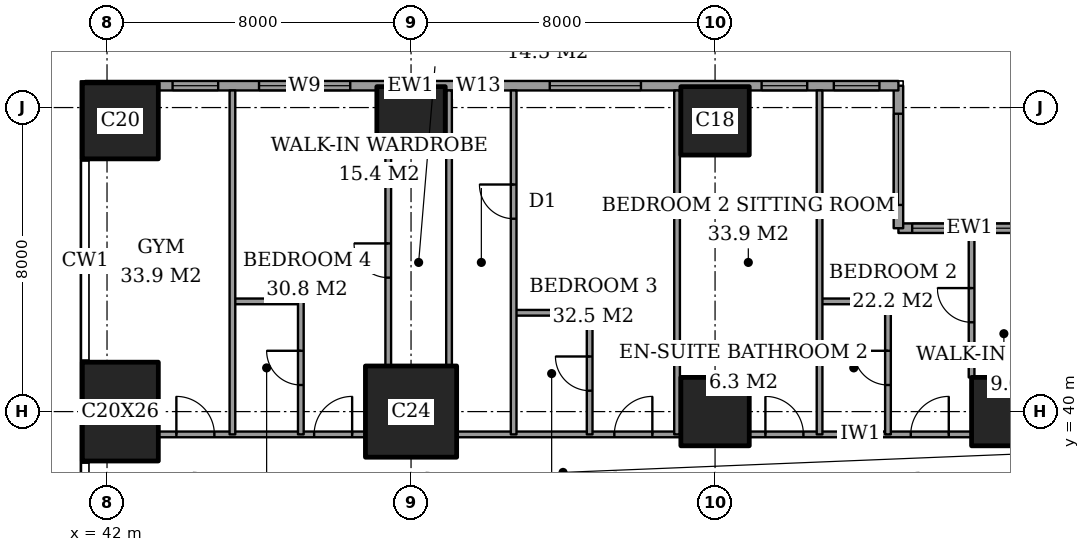
"""IFC4 building model, lengths in metres.
Left out: names, types, materials, properties, quantities, classifications, styles, units other than length and angle.
Written with IfcOpenShell. Run it as: python <this file> out.ifc"""

import sys

from ifc_helpers import new_model, si_unit, direction, frame, frame_2d, origin, origin_2d, place, context, subcontext, project, spatial, rectangle, extrude, element, fill, save


model = new_model("IFC4")
c1 = context("Model", 3, precision=1e-05, world=origin(), true_north=direction((0.0, 1.0)))
c2 = subcontext(c1, "Body", "Model", "MODEL_VIEW")
j1 = project(units=[si_unit("LENGTHUNIT", "METRE"), si_unit("PLANEANGLEUNIT", "RADIAN")], contexts=[c1])
p1 = place(None, origin())
s1 = spatial("IfcSite", under=j1, at=p1, CompositionType="ELEMENT")
p2 = place(p1, origin())
s2 = spatial("IfcBuilding", under=s1, at=p2, CompositionType="ELEMENT")
p3 = place(p2, frame((0.0, 0.0, 193.0)))
s3 = spatial("IfcBuildingStorey", under=s2, at=p3, CompositionType="ELEMENT", Elevation=193.0)
p4 = place(p3, frame((42.35, 40.0, 0.0), z_axis=(0.0, 0.0, 1.0), x_axis=(1.0, 0.0, 0.0)))
e1 = element("IfcColumn", 1, at=p4, inside=s3, PredefinedType="COLUMN", context=c2, shape_type="SweptSolid", body=[
    extrude(rectangle(XDim=2.0, YDim=2.6, at=origin_2d()), origin(), (0.0, 0.0, 1.0), 3.6),
])
p5 = place(p3, frame((42.35, 47.65, 0.0), z_axis=(0.0, 0.0, 1.0), x_axis=(1.0, 0.0, 0.0)))
e2 = element("IfcColumn", 2, at=p5, inside=s3, PredefinedType="COLUMN", context=c2, shape_type="SweptSolid", body=[
    extrude(rectangle(XDim=2.0, YDim=2.0, at=origin_2d()), origin(), (0.0, 0.0, 1.0), 3.6),
])
p6 = place(p3, frame((50.0, 40.0, 0.0), z_axis=(0.0, 0.0, 1.0), x_axis=(1.0, 0.0, 0.0)))
e3 = element("IfcColumn", 3, at=p6, inside=s3, PredefinedType="COLUMN", context=c2, shape_type="SweptSolid", body=[
    extrude(rectangle(XDim=2.4, YDim=2.4, at=origin_2d()), origin(), (0.0, 0.0, 1.0), 3.6),
])
for number, where, z_axis, x_axis in (
    (4, (50.0, 47.65, 0.0), (0.0, 0.0, 1.0), (1.0, 0.0, 0.0)),
    (5, (58.0, 40.0, 0.0), (0.0, 0.0, 1.0), (1.0, 0.0, 0.0)),
    (6, (58.0, 47.65, 0.0), (0.0, 0.0, 1.0), (1.0, 0.0, 0.0)),
    (7, (65.65, 40.0, 0.0), (0.0, 0.0, 1.0), (1.0, 0.0, 0.0)),
):
    element("IfcColumn", number, at=place(p3, frame(where, z_axis=z_axis, x_axis=x_axis)), inside=s3, PredefinedType="COLUMN", context=c2, shape_type="SweptSolid", body=[
        extrude(rectangle(XDim=1.8, YDim=1.8, at=origin_2d()), origin(), (0.0, 0.0, 1.0), 3.6),
    ])
p7 = place(p3, frame((66.575, 44.825, 0.0), z_axis=(0.0, 0.0, 1.0), x_axis=(-1.0, 0.0, 0.0)))
e8 = element("IfcWall", 8, at=p7, inside=s3, PredefinedType="SOLIDWALL", context=c2, shape_type="SweptSolid", body=[
    extrude(rectangle(XDim=3.75, YDim=0.25, at=frame_2d((1.875, 0.0))), origin(), (0.0, 0.0, 1.0), 3.6),
])
p8 = place(p7, frame((0.45, 0.0, 0.2)))
e9 = element("IfcOpeningElement", 9, at=p8, cuts=e8, PredefinedType="OPENING", context=c2, shape_type="SweptSolid", body=[
    extrude(rectangle(XDim=1.2, YDim=2.4, at=frame_2d((0.6, 1.2))), frame((0.0, 0.135, 0.0), z_axis=(0.0, -1.0, 0.0), x_axis=(1.0, 0.0, 0.0)), (0.0, 0.0, 1.0), 0.27),
])
p9 = place(p7, frame((2.188, 0.0, 0.2)))
e10 = element("IfcOpeningElement", 10, at=p9, cuts=e8, PredefinedType="OPENING", context=c2, shape_type="SweptSolid", body=[
    extrude(rectangle(XDim=1.2, YDim=2.4, at=frame_2d((0.6, 1.2))), frame((0.0, 0.135, 0.0), z_axis=(0.0, -1.0, 0.0), x_axis=(1.0, 0.0, 0.0)), (0.0, 0.0, 1.0), 0.27),
])
p10 = place(p3, frame((62.825, 44.825, 0.0), z_axis=(0.0, 0.0, 1.0), x_axis=(0.0, 1.0, 0.0)))
e11 = element("IfcWall", 11, at=p10, inside=s3, PredefinedType="SOLIDWALL", context=c2, shape_type="SweptSolid", body=[
    extrude(rectangle(XDim=3.75, YDim=0.25, at=frame_2d((1.875, 0.0))), origin(), (0.0, 0.0, 1.0), 3.6),
])
p11 = place(p10, frame((0.613, 0.0, 0.2)))
e12 = element("IfcOpeningElement", 12, at=p11, cuts=e11, PredefinedType="OPENING", context=c2, shape_type="SweptSolid", body=[
    extrude(rectangle(XDim=2.4, YDim=2.4, at=frame_2d((1.2, 1.2))), frame((0.0, 0.135, 0.0), z_axis=(0.0, -1.0, 0.0), x_axis=(1.0, 0.0, 0.0)), (0.0, 0.0, 1.0), 0.27),
])
p12 = place(p3, frame((62.825, 48.575, 0.0), z_axis=(0.0, 0.0, 1.0), x_axis=(-1.0, 0.0, 0.0)))
e13 = element("IfcWall", 13, at=p12, inside=s3, PredefinedType="SOLIDWALL", context=c2, shape_type="SweptSolid", body=[
    extrude(rectangle(XDim=21.4, YDim=0.25, at=frame_2d((10.7, 0.0))), origin(), (0.0, 0.0, 1.0), 3.6),
])
p13 = place(p12, frame((0.5, 0.0, 0.2)))
e14 = element("IfcOpeningElement", 14, at=p13, cuts=e13, PredefinedType="OPENING", context=c2, shape_type="SweptSolid", body=[
    extrude(rectangle(XDim=1.2, YDim=2.4, at=frame_2d((0.6, 1.2))), frame((0.0, 0.135, 0.0), z_axis=(0.0, -1.0, 0.0), x_axis=(1.0, 0.0, 0.0)), (0.0, 0.0, 1.0), 0.27),
])
p14 = place(p12, frame((2.4, 0.0, 0.2)))
e15 = element("IfcOpeningElement", 15, at=p14, cuts=e13, PredefinedType="OPENING", context=c2, shape_type="SweptSolid", body=[
    extrude(rectangle(XDim=1.2, YDim=2.4, at=frame_2d((0.6, 1.2))), frame((0.0, 0.135, 0.0), z_axis=(0.0, -1.0, 0.0), x_axis=(1.0, 0.0, 0.0)), (0.0, 0.0, 1.0), 0.27),
])
p15 = place(p12, frame((6.775, 0.0, 0.2)))
e16 = element("IfcOpeningElement", 16, at=p15, cuts=e13, PredefinedType="OPENING", context=c2, shape_type="SweptSolid", body=[
    extrude(rectangle(XDim=2.4, YDim=2.4, at=frame_2d((1.2, 1.2))), frame((0.0, 0.135, 0.0), z_axis=(0.0, -1.0, 0.0), x_axis=(1.0, 0.0, 0.0)), (0.0, 0.0, 1.0), 0.27),
])
p16 = place(p12, frame((10.45, 0.0, 0.2)))
e17 = element("IfcOpeningElement", 17, at=p16, cuts=e13, PredefinedType="OPENING", context=c2, shape_type="SweptSolid", body=[
    extrude(rectangle(XDim=1.2, YDim=2.4, at=frame_2d((0.6, 1.2))), frame((0.0, 0.135, 0.0), z_axis=(0.0, -1.0, 0.0), x_axis=(1.0, 0.0, 0.0)), (0.0, 0.0, 1.0), 0.27),
])
p17 = place(p12, frame((14.425, 0.0, 0.2)))
e18 = element("IfcOpeningElement", 18, at=p17, cuts=e13, PredefinedType="OPENING", context=c2, shape_type="SweptSolid", body=[
    extrude(rectangle(XDim=2.4, YDim=2.4, at=frame_2d((1.2, 1.2))), frame((0.0, 0.135, 0.0), z_axis=(0.0, -1.0, 0.0), x_axis=(1.0, 0.0, 0.0)), (0.0, 0.0, 1.0), 0.27),
])
p18 = place(p12, frame((17.9, 0.0, 0.2)))
e19 = element("IfcOpeningElement", 19, at=p18, cuts=e13, PredefinedType="OPENING", context=c2, shape_type="SweptSolid", body=[
    extrude(rectangle(XDim=1.2, YDim=2.4, at=frame_2d((0.6, 1.2))), frame((0.0, 0.135, 0.0), z_axis=(0.0, -1.0, 0.0), x_axis=(1.0, 0.0, 0.0)), (0.0, 0.0, 1.0), 0.27),
])
p19 = place(p3, frame((43.35, 39.4, 0.0), z_axis=(0.0, 0.0, 1.0), x_axis=(1.0, 0.0, 0.0)))
e20 = element("IfcWall", 20, at=p19, inside=s3, PredefinedType="PARTITIONING", context=c2, shape_type="SweptSolid", body=[
    extrude(rectangle(XDim=5.45, YDim=0.15, at=frame_2d((2.725, 0.0))), origin(), (0.0, 0.0, 1.0), 3.35),
])
p20 = place(p19, frame((4.1, 0.0, 0.0)))
e21 = element("IfcOpeningElement", 21, at=p20, cuts=e20, PredefinedType="OPENING", context=c2, shape_type="SweptSolid", body=[
    extrude(rectangle(XDim=1.0, YDim=2.1, at=frame_2d((0.5, 1.05))), frame((0.0, 0.085, 0.0), z_axis=(0.0, -1.0, 0.0), x_axis=(1.0, 0.0, 0.0)), (0.0, 0.0, 1.0), 0.17),
])
p21 = place(p19, frame((0.475, 0.0, 0.0)))
e22 = element("IfcOpeningElement", 22, at=p21, cuts=e20, PredefinedType="OPENING", context=c2, shape_type="SweptSolid", body=[
    extrude(rectangle(XDim=1.0, YDim=2.1, at=frame_2d((0.5, 1.05))), frame((0.0, 0.085, 0.0), z_axis=(0.0, -1.0, 0.0), x_axis=(1.0, 0.0, 0.0)), (0.0, 0.0, 1.0), 0.17),
])
p22 = place(p3, frame((51.2, 39.4, 0.0), z_axis=(0.0, 0.0, 1.0), x_axis=(1.0, 0.0, 0.0)))
e23 = element("IfcWall", 23, at=p22, inside=s3, PredefinedType="PARTITIONING", context=c2, shape_type="SweptSolid", body=[
    extrude(rectangle(XDim=5.9, YDim=0.15, at=frame_2d((2.95, 0.0))), origin(), (0.0, 0.0, 1.0), 3.35),
])
p23 = place(p22, frame((4.15, 0.0, 0.0)))
e24 = element("IfcOpeningElement", 24, at=p23, cuts=e23, PredefinedType="OPENING", context=c2, shape_type="SweptSolid", body=[
    extrude(rectangle(XDim=1.0, YDim=2.1, at=frame_2d((0.5, 1.05))), frame((0.0, 0.085, 0.0), z_axis=(0.0, -1.0, 0.0), x_axis=(1.0, 0.0, 0.0)), (0.0, 0.0, 1.0), 0.17),
])
p24 = place(p3, frame((58.9, 39.4, 0.0), z_axis=(0.0, 0.0, 1.0), x_axis=(1.0, 0.0, 0.0)))
e25 = element("IfcWall", 25, at=p24, inside=s3, PredefinedType="PARTITIONING", context=c2, shape_type="SweptSolid", body=[
    extrude(rectangle(XDim=5.85, YDim=0.15, at=frame_2d((2.925, 0.0))), origin(), (0.0, 0.0, 1.0), 3.35),
])
p25 = place(p24, frame((4.25, 0.0, 0.0)))
e26 = element("IfcOpeningElement", 26, at=p25, cuts=e25, PredefinedType="OPENING", context=c2, shape_type="SweptSolid", body=[
    extrude(rectangle(XDim=1.0, YDim=2.1, at=frame_2d((0.5, 1.05))), frame((0.0, 0.085, 0.0), z_axis=(0.0, -1.0, 0.0), x_axis=(1.0, 0.0, 0.0)), (0.0, 0.0, 1.0), 0.17),
])
p26 = place(p24, frame((0.425, 0.0, 0.0)))
e27 = element("IfcOpeningElement", 27, at=p26, cuts=e25, PredefinedType="OPENING", context=c2, shape_type="SweptSolid", body=[
    extrude(rectangle(XDim=1.0, YDim=2.1, at=frame_2d((0.5, 1.05))), frame((0.0, 0.085, 0.0), z_axis=(0.0, -1.0, 0.0), x_axis=(1.0, 0.0, 0.0)), (0.0, 0.0, 1.0), 0.17),
])
p27 = place(p3, frame((52.7, 42.6, 0.0), z_axis=(0.0, 0.0, 1.0), x_axis=(1.0, 0.0, 0.0)))
e28 = element("IfcWall", 28, at=p27, inside=s3, PredefinedType="PARTITIONING", context=c2, shape_type="SweptSolid", body=[
    extrude(rectangle(XDim=2.0, YDim=0.15, at=frame_2d((1.0, 0.0))), origin(), (0.0, 0.0, 1.0), 3.35),
])
for number, where, z_axis, x_axis in (
    (29, (45.3, 42.9, 0.0), (0.0, 0.0, 1.0), (1.0, 0.0, 0.0)),
    (30, (60.75, 42.9, 0.0), (0.0, 0.0, 1.0), (1.0, 0.0, 0.0)),
):
    element("IfcWall", number, at=place(p3, frame(where, z_axis=z_axis, x_axis=x_axis)), inside=s3, PredefinedType="PARTITIONING", context=c2, shape_type="SweptSolid", body=[
        extrude(rectangle(XDim=1.8, YDim=0.15, at=frame_2d((0.9, 0.0))), origin(), (0.0, 0.0, 1.0), 3.35),
    ])
p28 = place(p3, frame((45.3, 39.4, 0.0), z_axis=(0.0, 0.0, 1.0), x_axis=(0.0, 1.0, 0.0)))
e31 = element("IfcWall", 31, at=p28, inside=s3, PredefinedType="PARTITIONING", context=c2, shape_type="SweptSolid", body=[
    extrude(rectangle(XDim=9.05, YDim=0.15, at=frame_2d((4.525, 0.0))), origin(), (0.0, 0.0, 1.0), 3.35),
])
p29 = place(p3, frame((47.1, 39.4, 0.0), z_axis=(0.0, 0.0, 1.0), x_axis=(0.0, 1.0, 0.0)))
e32 = element("IfcWall", 32, at=p29, inside=s3, PredefinedType="PARTITIONING", context=c2, shape_type="SweptSolid", body=[
    extrude(rectangle(XDim=3.5, YDim=0.15, at=frame_2d((1.75, 0.0))), origin(), (0.0, 0.0, 1.0), 3.35),
])
p30 = place(p29, frame((1.3, 0.0, 0.0)))
e33 = element("IfcOpeningElement", 33, at=p30, cuts=e32, PredefinedType="OPENING", context=c2, shape_type="SweptSolid", body=[
    extrude(rectangle(XDim=0.9, YDim=2.1, at=frame_2d((0.45, 1.05))), frame((0.0, 0.085, 0.0), z_axis=(0.0, -1.0, 0.0), x_axis=(1.0, 0.0, 0.0)), (0.0, 0.0, 1.0), 0.17),
])
p31 = place(p3, frame((49.4, 41.2, 0.0), z_axis=(0.0, 0.0, 1.0), x_axis=(0.0, 1.0, 0.0)))
e34 = element("IfcWall", 34, at=p31, inside=s3, PredefinedType="PARTITIONING", context=c2, shape_type="SweptSolid", body=[
    extrude(rectangle(XDim=5.55, YDim=0.15, at=frame_2d((2.775, 0.0))), origin(), (0.0, 0.0, 1.0), 3.35),
])
p32 = place(p31, frame((2.325, 0.0, 0.0)))
e35 = element("IfcOpeningElement", 35, at=p32, cuts=e34, PredefinedType="OPENING", context=c2, shape_type="SweptSolid", body=[
    extrude(rectangle(XDim=0.9, YDim=2.1, at=frame_2d((0.45, 1.05))), frame((0.0, 0.085, 0.0), z_axis=(0.0, -1.0, 0.0), x_axis=(1.0, 0.0, 0.0)), (0.0, 0.0, 1.0), 0.17),
])
p33 = place(p3, frame((51.0, 41.2, 0.0), z_axis=(0.0, 0.0, 1.0), x_axis=(0.0, 1.0, 0.0)))
e36 = element("IfcWall", 36, at=p33, inside=s3, PredefinedType="PARTITIONING", context=c2, shape_type="SweptSolid", body=[
    extrude(rectangle(XDim=7.25, YDim=0.15, at=frame_2d((3.625, 0.0))), origin(), (0.0, 0.0, 1.0), 3.35),
])
p34 = place(p3, frame((52.7, 39.4, 0.0), z_axis=(0.0, 0.0, 1.0), x_axis=(0.0, 1.0, 0.0)))
e37 = element("IfcWall", 37, at=p34, inside=s3, PredefinedType="PARTITIONING", context=c2, shape_type="SweptSolid", body=[
    extrude(rectangle(XDim=9.05, YDim=0.15, at=frame_2d((4.525, 0.0))), origin(), (0.0, 0.0, 1.0), 3.35),
])
p35 = place(p34, frame((5.675, 0.0, 0.0)))
e38 = element("IfcOpeningElement", 38, at=p35, cuts=e37, PredefinedType="OPENING", context=c2, shape_type="SweptSolid", body=[
    extrude(rectangle(XDim=0.9, YDim=2.1, at=frame_2d((0.45, 1.05))), frame((0.0, 0.085, 0.0), z_axis=(0.0, -1.0, 0.0), x_axis=(1.0, 0.0, 0.0)), (0.0, 0.0, 1.0), 0.17),
])
p36 = place(p3, frame((54.7, 39.4, 0.0), z_axis=(0.0, 0.0, 1.0), x_axis=(0.0, 1.0, 0.0)))
e39 = element("IfcWall", 39, at=p36, inside=s3, PredefinedType="PARTITIONING", context=c2, shape_type="SweptSolid", body=[
    extrude(rectangle(XDim=3.2, YDim=0.15, at=frame_2d((1.6, 0.0))), origin(), (0.0, 0.0, 1.0), 3.35),
])
p37 = place(p36, frame((1.15, 0.0, 0.0)))
e40 = element("IfcOpeningElement", 40, at=p37, cuts=e39, PredefinedType="OPENING", context=c2, shape_type="SweptSolid", body=[
    extrude(rectangle(XDim=0.9, YDim=2.1, at=frame_2d((0.45, 1.05))), frame((0.0, 0.085, 0.0), z_axis=(0.0, -1.0, 0.0), x_axis=(1.0, 0.0, 0.0)), (0.0, 0.0, 1.0), 0.17),
])
for number, where, z_axis, x_axis in (
    (41, (57.0, 39.4, 0.0), (0.0, 0.0, 1.0), (0.0, 1.0, 0.0)),
    (42, (60.75, 39.4, 0.0), (0.0, 0.0, 1.0), (0.0, 1.0, 0.0)),
):
    element("IfcWall", number, at=place(p3, frame(where, z_axis=z_axis, x_axis=x_axis)), inside=s3, PredefinedType="PARTITIONING", context=c2, shape_type="SweptSolid", body=[
        extrude(rectangle(XDim=9.05, YDim=0.15, at=frame_2d((4.525, 0.0))), origin(), (0.0, 0.0, 1.0), 3.35),
    ])
p38 = place(p3, frame((62.55, 39.4, 0.0), z_axis=(0.0, 0.0, 1.0), x_axis=(0.0, 1.0, 0.0)))
e43 = element("IfcWall", 43, at=p38, inside=s3, PredefinedType="PARTITIONING", context=c2, shape_type="SweptSolid", body=[
    extrude(rectangle(XDim=3.5, YDim=0.15, at=frame_2d((1.75, 0.0))), origin(), (0.0, 0.0, 1.0), 3.35),
])
p39 = place(p38, frame((1.3, 0.0, 0.0)))
e44 = element("IfcOpeningElement", 44, at=p39, cuts=e43, PredefinedType="OPENING", context=c2, shape_type="SweptSolid", body=[
    extrude(rectangle(XDim=0.9, YDim=2.1, at=frame_2d((0.45, 1.05))), frame((0.0, 0.085, 0.0), z_axis=(0.0, -1.0, 0.0), x_axis=(1.0, 0.0, 0.0)), (0.0, 0.0, 1.0), 0.17),
])
p40 = place(p3, frame((64.75, 40.9, 0.0), z_axis=(0.0, 0.0, 1.0), x_axis=(0.0, 1.0, 0.0)))
e45 = element("IfcWall", 45, at=p40, inside=s3, PredefinedType="PARTITIONING", context=c2, shape_type="SweptSolid", body=[
    extrude(rectangle(XDim=3.8, YDim=0.15, at=frame_2d((1.9, 0.0))), origin(), (0.0, 0.0, 1.0), 3.35),
])
p41 = place(p40, frame((1.45, 0.0, 0.0)))
e46 = element("IfcOpeningElement", 46, at=p41, cuts=e45, PredefinedType="OPENING", context=c2, shape_type="SweptSolid", body=[
    extrude(rectangle(XDim=0.9, YDim=2.1, at=frame_2d((0.45, 1.05))), frame((0.0, 0.085, 0.0), z_axis=(0.0, -1.0, 0.0), x_axis=(1.0, 0.0, 0.0)), (0.0, 0.0, 1.0), 0.17),
])
p42 = place(p8, origin())
e47 = element("IfcWindow", 47, at=p42, inside=s3, PartitioningType="SINGLE_PANEL", PredefinedType="WINDOW", context=c2, shape_type="SweptSolid", body=[
    extrude(rectangle(XDim=1.2, YDim=2.4, at=frame_2d((0.6, 1.2))), frame((0.0, 0.03, 0.0), z_axis=(0.0, -1.0, 0.0), x_axis=(1.0, 0.0, 0.0)), (0.0, 0.0, 1.0), 0.06),
])
fill(e9, e47)
p43 = place(p9, origin())
e48 = element("IfcWindow", 48, at=p43, inside=s3, PartitioningType="SINGLE_PANEL", PredefinedType="WINDOW", context=c2, shape_type="SweptSolid", body=[
    extrude(rectangle(XDim=1.2, YDim=2.4, at=frame_2d((0.6, 1.2))), frame((0.0, 0.03, 0.0), z_axis=(0.0, -1.0, 0.0), x_axis=(1.0, 0.0, 0.0)), (0.0, 0.0, 1.0), 0.06),
])
fill(e10, e48)
p44 = place(p11, origin())
e49 = element("IfcWindow", 49, at=p44, inside=s3, PartitioningType="SINGLE_PANEL", PredefinedType="WINDOW", context=c2, shape_type="SweptSolid", body=[
    extrude(rectangle(XDim=2.4, YDim=2.4, at=frame_2d((1.2, 1.2))), frame((0.0, 0.03, 0.0), z_axis=(0.0, -1.0, 0.0), x_axis=(1.0, 0.0, 0.0)), (0.0, 0.0, 1.0), 0.06),
])
fill(e12, e49)
p45 = place(p13, origin())
e50 = element("IfcWindow", 50, at=p45, inside=s3, PartitioningType="SINGLE_PANEL", PredefinedType="WINDOW", context=c2, shape_type="SweptSolid", body=[
    extrude(rectangle(XDim=1.2, YDim=2.4, at=frame_2d((0.6, 1.2))), frame((0.0, 0.03, 0.0), z_axis=(0.0, -1.0, 0.0), x_axis=(1.0, 0.0, 0.0)), (0.0, 0.0, 1.0), 0.06),
])
fill(e14, e50)
p46 = place(p14, origin())
e51 = element("IfcWindow", 51, at=p46, inside=s3, PartitioningType="SINGLE_PANEL", PredefinedType="WINDOW", context=c2, shape_type="SweptSolid", body=[
    extrude(rectangle(XDim=1.2, YDim=2.4, at=frame_2d((0.6, 1.2))), frame((0.0, 0.03, 0.0), z_axis=(0.0, -1.0, 0.0), x_axis=(1.0, 0.0, 0.0)), (0.0, 0.0, 1.0), 0.06),
])
fill(e15, e51)
p47 = place(p15, origin())
e52 = element("IfcWindow", 52, at=p47, inside=s3, PartitioningType="SINGLE_PANEL", PredefinedType="WINDOW", context=c2, shape_type="SweptSolid", body=[
    extrude(rectangle(XDim=2.4, YDim=2.4, at=frame_2d((1.2, 1.2))), frame((0.0, 0.03, 0.0), z_axis=(0.0, -1.0, 0.0), x_axis=(1.0, 0.0, 0.0)), (0.0, 0.0, 1.0), 0.06),
])
fill(e16, e52)
p48 = place(p16, origin())
e53 = element("IfcWindow", 53, at=p48, inside=s3, PartitioningType="SINGLE_PANEL", PredefinedType="WINDOW", context=c2, shape_type="SweptSolid", body=[
    extrude(rectangle(XDim=1.2, YDim=2.4, at=frame_2d((0.6, 1.2))), frame((0.0, 0.03, 0.0), z_axis=(0.0, -1.0, 0.0), x_axis=(1.0, 0.0, 0.0)), (0.0, 0.0, 1.0), 0.06),
])
fill(e17, e53)
p49 = place(p17, origin())
e54 = element("IfcWindow", 54, at=p49, inside=s3, PartitioningType="SINGLE_PANEL", PredefinedType="WINDOW", context=c2, shape_type="SweptSolid", body=[
    extrude(rectangle(XDim=2.4, YDim=2.4, at=frame_2d((1.2, 1.2))), frame((0.0, 0.03, 0.0), z_axis=(0.0, -1.0, 0.0), x_axis=(1.0, 0.0, 0.0)), (0.0, 0.0, 1.0), 0.06),
])
fill(e18, e54)
p50 = place(p18, origin())
e55 = element("IfcWindow", 55, at=p50, inside=s3, PartitioningType="SINGLE_PANEL", PredefinedType="WINDOW", context=c2, shape_type="SweptSolid", body=[
    extrude(rectangle(XDim=1.2, YDim=2.4, at=frame_2d((0.6, 1.2))), frame((0.0, 0.03, 0.0), z_axis=(0.0, -1.0, 0.0), x_axis=(1.0, 0.0, 0.0)), (0.0, 0.0, 1.0), 0.06),
])
fill(e19, e55)
p51 = place(p41, origin())
e56 = element("IfcDoor", 56, at=p51, inside=s3, OperationType="SINGLE_SWING_LEFT", PredefinedType="DOOR", context=c2, shape_type="SweptSolid", body=[
    extrude(rectangle(XDim=0.9, YDim=2.1, at=frame_2d((0.45, 1.05))), frame((0.0, 0.025, 0.0), z_axis=(0.0, -1.0, 0.0), x_axis=(1.0, 0.0, 0.0)), (0.0, 0.0, 1.0), 0.05),
])
fill(e46, e56)
p52 = place(p39, origin())
e57 = element("IfcDoor", 57, at=p52, inside=s3, OperationType="SINGLE_SWING_LEFT", PredefinedType="DOOR", context=c2, shape_type="SweptSolid", body=[
    extrude(rectangle(XDim=0.9, YDim=2.1, at=frame_2d((0.45, 1.05))), frame((0.0, 0.025, 0.0), z_axis=(0.0, -1.0, 0.0), x_axis=(1.0, 0.0, 0.0)), (0.0, 0.0, 1.0), 0.05),
])
fill(e44, e57)
p53 = place(p25, origin())
e58 = element("IfcDoor", 58, at=p53, inside=s3, OperationType="SINGLE_SWING_LEFT", PredefinedType="DOOR", context=c2, shape_type="SweptSolid", body=[
    extrude(rectangle(XDim=1.0, YDim=2.1, at=frame_2d((0.5, 1.05))), frame((0.0, 0.025, 0.0), z_axis=(0.0, -1.0, 0.0), x_axis=(1.0, 0.0, 0.0)), (0.0, 0.0, 1.0), 0.05),
])
fill(e26, e58)
p54 = place(p26, origin())
e59 = element("IfcDoor", 59, at=p54, inside=s3, OperationType="SINGLE_SWING_RIGHT", PredefinedType="DOOR", context=c2, shape_type="SweptSolid", body=[
    extrude(rectangle(XDim=1.0, YDim=2.1, at=frame_2d((0.5, 1.05))), frame((0.0, 0.025, 0.0), z_axis=(0.0, -1.0, 0.0), x_axis=(1.0, 0.0, 0.0)), (0.0, 0.0, 1.0), 0.05),
])
fill(e27, e59)
p55 = place(p37, origin())
e60 = element("IfcDoor", 60, at=p55, inside=s3, OperationType="SINGLE_SWING_LEFT", PredefinedType="DOOR", context=c2, shape_type="SweptSolid", body=[
    extrude(rectangle(XDim=0.9, YDim=2.1, at=frame_2d((0.45, 1.05))), frame((0.0, 0.025, 0.0), z_axis=(0.0, -1.0, 0.0), x_axis=(1.0, 0.0, 0.0)), (0.0, 0.0, 1.0), 0.05),
])
fill(e40, e60)
p56 = place(p23, origin())
e61 = element("IfcDoor", 61, at=p56, inside=s3, OperationType="SINGLE_SWING_LEFT", PredefinedType="DOOR", context=c2, shape_type="SweptSolid", body=[
    extrude(rectangle(XDim=1.0, YDim=2.1, at=frame_2d((0.5, 1.05))), frame((0.0, 0.025, 0.0), z_axis=(0.0, -1.0, 0.0), x_axis=(1.0, 0.0, 0.0)), (0.0, 0.0, 1.0), 0.05),
])
fill(e24, e61)
p57 = place(p35, origin())
e62 = element("IfcDoor", 62, at=p57, inside=s3, OperationType="SINGLE_SWING_LEFT", PredefinedType="DOOR", context=c2, shape_type="SweptSolid", body=[
    extrude(rectangle(XDim=0.9, YDim=2.1, at=frame_2d((0.45, 1.05))), frame((0.0, 0.025, 0.0), z_axis=(0.0, -1.0, 0.0), x_axis=(1.0, 0.0, 0.0)), (0.0, 0.0, 1.0), 0.05),
])
fill(e38, e62)
p58 = place(p32, origin())
e63 = element("IfcDoor", 63, at=p58, inside=s3, OperationType="SINGLE_SWING_LEFT", PredefinedType="DOOR", context=c2, shape_type="SweptSolid", body=[
    extrude(rectangle(XDim=0.9, YDim=2.1, at=frame_2d((0.45, 1.05))), frame((0.0, 0.025, 0.0), z_axis=(0.0, -1.0, 0.0), x_axis=(1.0, 0.0, 0.0)), (0.0, 0.0, 1.0), 0.05),
])
fill(e35, e63)
p59 = place(p30, origin())
e64 = element("IfcDoor", 64, at=p59, inside=s3, OperationType="SINGLE_SWING_LEFT", PredefinedType="DOOR", context=c2, shape_type="SweptSolid", body=[
    extrude(rectangle(XDim=0.9, YDim=2.1, at=frame_2d((0.45, 1.05))), frame((0.0, 0.025, 0.0), z_axis=(0.0, -1.0, 0.0), x_axis=(1.0, 0.0, 0.0)), (0.0, 0.0, 1.0), 0.05),
])
fill(e33, e64)
p60 = place(p20, origin())
e65 = element("IfcDoor", 65, at=p60, inside=s3, OperationType="SINGLE_SWING_LEFT", PredefinedType="DOOR", context=c2, shape_type="SweptSolid", body=[
    extrude(rectangle(XDim=1.0, YDim=2.1, at=frame_2d((0.5, 1.05))), frame((0.0, 0.025, 0.0), z_axis=(0.0, -1.0, 0.0), x_axis=(1.0, 0.0, 0.0)), (0.0, 0.0, 1.0), 0.05),
])
fill(e21, e65)
p61 = place(p21, origin())
e66 = element("IfcDoor", 66, at=p61, inside=s3, OperationType="SINGLE_SWING_RIGHT", PredefinedType="DOOR", context=c2, shape_type="SweptSolid", body=[
    extrude(rectangle(XDim=1.0, YDim=2.1, at=frame_2d((0.5, 1.05))), frame((0.0, 0.025, 0.0), z_axis=(0.0, -1.0, 0.0), x_axis=(1.0, 0.0, 0.0)), (0.0, 0.0, 1.0), 0.05),
])
fill(e22, e66)
save(model, sys.argv[1])
